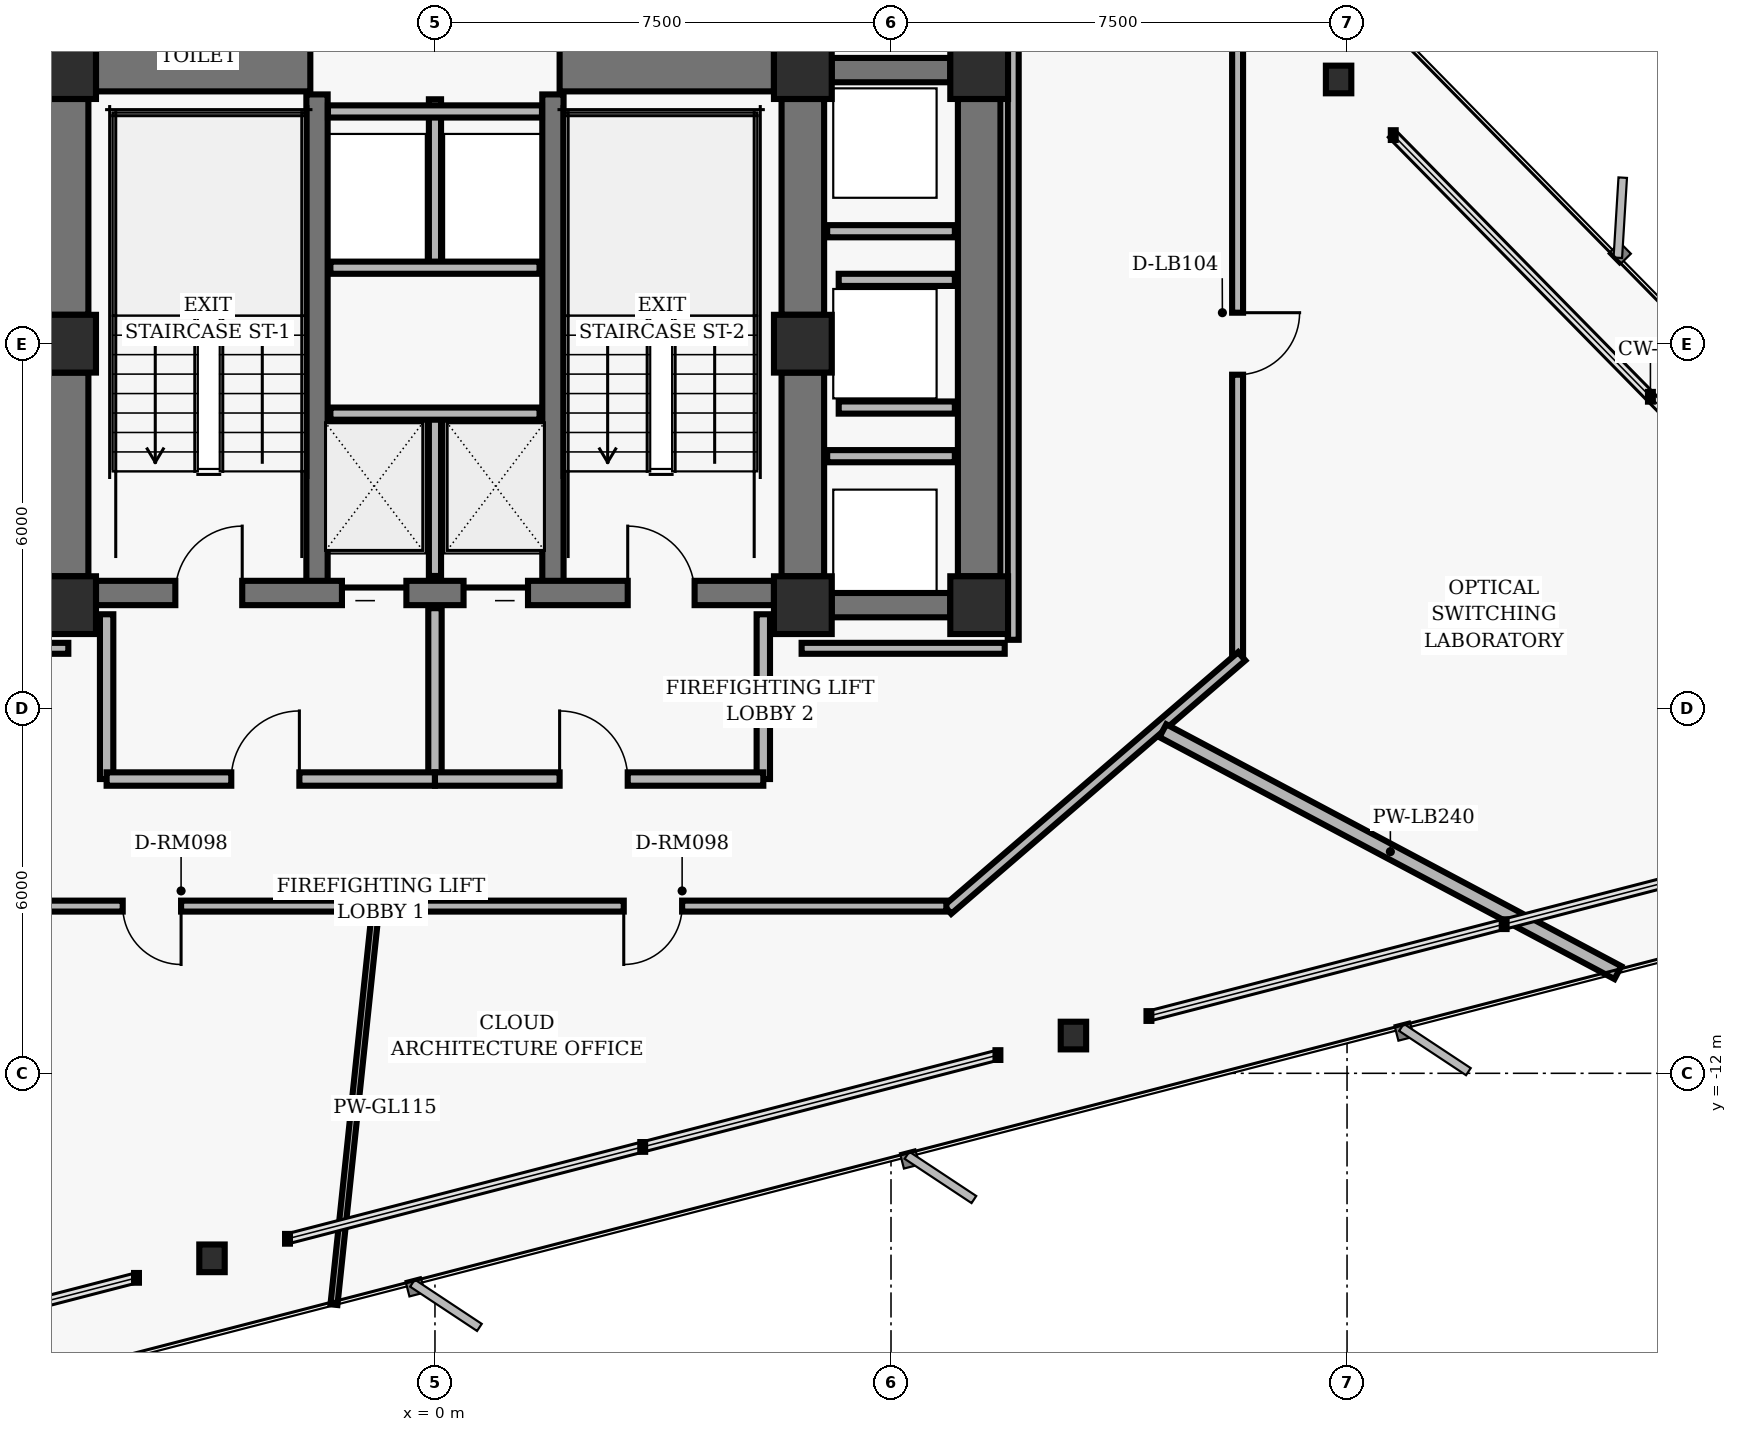
"""IFC4 building model, lengths in metres.
Left out: names, types, materials, properties, quantities, classifications, styles, units other than length and angle.
Written with IfcOpenShell. Run it as: python <this file> out.ifc"""

import sys

from ifc_helpers import new_model, si_unit, direction, frame, frame_2d, origin, origin_2d, place, context, subcontext, project, spatial, rectangle, hollow_rectangle, i_section, extrude, element, fill, save


model = new_model("IFC4")
c1 = context("Model", 3, precision=1e-05, world=origin(), true_north=direction((0.0, 1.0)))
c2 = subcontext(c1, "Body", "Model", "MODEL_VIEW")
j1 = project(units=[si_unit("LENGTHUNIT", "METRE"), si_unit("PLANEANGLEUNIT", "RADIAN")], contexts=[c1])
p1 = place(None, origin())
s1 = spatial("IfcSite", under=j1, at=p1, CompositionType="ELEMENT")
p2 = place(p1, origin())
s2 = spatial("IfcBuilding", under=s1, at=p2, CompositionType="ELEMENT")
p3 = place(p2, frame((0.0, 0.0, 85.6)))
s3 = spatial("IfcBuildingStorey", under=s2, at=p3, CompositionType="ELEMENT", Elevation=85.6)
for number, where, z_axis, x_axis in (
    (1, (-6.05, 4.5, 0.0), (0.0, 0.0, 1.0), (1.0, 0.0, 0.0)),
    (2, (6.05, 4.5, 0.0), (0.0, 0.0, 1.0), (1.0, 0.0, 0.0)),
    (3, (-6.05, 0.0, 0.0), (0.0, 0.0, 1.0), (1.0, 0.0, 0.0)),
    (4, (6.05, 0.0, 0.0), (0.0, 0.0, 1.0), (1.0, 0.0, 0.0)),
    (5, (-6.05, -4.3, 0.0), (0.0, 0.0, 1.0), (1.0, 0.0, 0.0)),
    (6, (6.05, -4.3, 0.0), (0.0, 0.0, 1.0), (1.0, 0.0, 0.0)),
    (7, (8.95, 4.5, 0.0), (0.0, 0.0, 1.0), (1.0, 0.0, 0.0)),
    (8, (8.95, -4.3, 0.0), (0.0, 0.0, 1.0), (1.0, 0.0, 0.0)),
):
    element("IfcColumn", number, at=place(p3, frame(where, z_axis=z_axis, x_axis=x_axis)), inside=s3, PredefinedType="COLUMN", context=c2, shape_type="SweptSolid", body=[
        extrude(hollow_rectangle(XDim=0.95, YDim=0.95, WallThickness=0.06, InnerFilletRadius=0.02, OuterFilletRadius=0.04, at=origin_2d()), origin(), (0.0, 0.0, 1.0), 3.04),
    ])
p4 = place(p3, frame((-6.05, 0.475, 0.0), z_axis=(0.0, 0.0, 1.0), x_axis=(0.0, 1.0, 0.0)))
e9 = element("IfcWall", 9, at=p4, inside=s3, PredefinedType="SHEAR", context=c2, shape_type="SweptSolid", body=[
    extrude(rectangle(XDim=3.55, YDim=0.7, at=frame_2d((1.775, 0.0))), origin(), (0.0, 0.0, 1.0), 2.788),
])
p5 = place(p3, frame((-6.05, -3.825, 0.0), z_axis=(0.0, 0.0, 1.0), x_axis=(0.0, 1.0, 0.0)))
e10 = element("IfcWall", 10, at=p5, inside=s3, PredefinedType="SHEAR", context=c2, shape_type="SweptSolid", body=[
    extrude(rectangle(XDim=3.35, YDim=0.7, at=frame_2d((1.675, 0.0))), origin(), (0.0, 0.0, 1.0), 2.788),
])
p6 = place(p3, frame((6.05, 0.475, 0.0), z_axis=(0.0, 0.0, 1.0), x_axis=(0.0, 1.0, 0.0)))
e11 = element("IfcWall", 11, at=p6, inside=s3, PredefinedType="SHEAR", context=c2, shape_type="SweptSolid", body=[
    extrude(rectangle(XDim=3.55, YDim=0.7, at=frame_2d((1.775, 0.0))), origin(), (0.0, 0.0, 1.0), 2.788),
])
p7 = place(p3, frame((6.05, -3.825, 0.0), z_axis=(0.0, 0.0, 1.0), x_axis=(0.0, 1.0, 0.0)))
e12 = element("IfcWall", 12, at=p7, inside=s3, PredefinedType="SHEAR", context=c2, shape_type="SweptSolid", body=[
    extrude(rectangle(XDim=3.35, YDim=0.7, at=frame_2d((1.675, 0.0))), origin(), (0.0, 0.0, 1.0), 2.788),
])
for number, where, z_axis, x_axis in (
    (13, (-1.94, -4.1, 0.0), (0.0, 0.0, 1.0), (0.0, 1.0, 0.0)),
    (14, (1.94, -4.1, 0.0), (0.0, 0.0, 1.0), (0.0, 1.0, 0.0)),
):
    element("IfcWall", number, at=place(p3, frame(where, z_axis=z_axis, x_axis=x_axis)), inside=s3, PredefinedType="SHEAR", context=c2, shape_type="SweptSolid", body=[
        extrude(rectangle(XDim=8.2, YDim=0.35, at=frame_2d((4.1, 0.0))), origin(), (0.0, 0.0, 1.0), 2.788),
    ])
p8 = place(p3, frame((-5.575, -4.1, 0.0), z_axis=(0.0, 0.0, 1.0), x_axis=(1.0, 0.0, 0.0)))
e15 = element("IfcWall", 15, at=p8, inside=s3, PredefinedType="SHEAR", context=c2, shape_type="SweptSolid", body=[
    extrude(rectangle(XDim=11.15, YDim=0.4, at=frame_2d((5.575, 0.0))), origin(), (0.0, 0.0, 1.0), 2.788),
])
p9 = place(p8, frame((1.305, 0.0, 0.0)))
e16 = element("IfcOpeningElement", 16, at=p9, cuts=e15, PredefinedType="OPENING", context=c2, shape_type="SweptSolid", body=[
    extrude(rectangle(XDim=1.1, YDim=2.04, at=frame_2d((0.55, 1.02))), frame((0.0, 0.21, 0.0), z_axis=(0.0, -1.0, 0.0), x_axis=(1.0, 0.0, 0.0)), (0.0, 0.0, 1.0), 0.42),
])
p10 = place(p8, frame((8.745, 0.0, 0.0)))
e17 = element("IfcOpeningElement", 17, at=p10, cuts=e15, PredefinedType="OPENING", context=c2, shape_type="SweptSolid", body=[
    extrude(rectangle(XDim=1.1, YDim=2.04, at=frame_2d((0.55, 1.02))), frame((0.0, 0.21, 0.0), z_axis=(0.0, -1.0, 0.0), x_axis=(1.0, 0.0, 0.0)), (0.0, 0.0, 1.0), 0.42),
])
p11 = place(p8, frame((4.045, 0.0, 0.0)))
e18 = element("IfcOpeningElement", 18, at=p11, cuts=e15, PredefinedType="OPENING", context=c2, shape_type="SweptSolid", body=[
    extrude(rectangle(XDim=1.06, YDim=2.04, at=frame_2d((0.53, 1.02))), frame((0.0, 0.21, 0.0), z_axis=(0.0, -1.0, 0.0), x_axis=(1.0, 0.0, 0.0)), (0.0, 0.0, 1.0), 0.42),
])
p12 = place(p8, frame((6.045, 0.0, 0.0)))
e19 = element("IfcOpeningElement", 19, at=p12, cuts=e15, PredefinedType="OPENING", context=c2, shape_type="SweptSolid", body=[
    extrude(rectangle(XDim=1.06, YDim=2.04, at=frame_2d((0.53, 1.02))), frame((0.0, 0.21, 0.0), z_axis=(0.0, -1.0, 0.0), x_axis=(1.0, 0.0, 0.0)), (0.0, 0.0, 1.0), 0.42),
])
for number, where, z_axis, x_axis in (
    (20, (-5.575, 4.5, 0.0), (0.0, 0.0, 1.0), (1.0, 0.0, 0.0)),
    (21, (2.05, 4.5, 0.0), (0.0, 0.0, 1.0), (1.0, 0.0, 0.0)),
):
    element("IfcWall", number, at=place(p3, frame(where, z_axis=z_axis, x_axis=x_axis)), inside=s3, PredefinedType="SHEAR", context=c2, shape_type="SweptSolid", body=[
        extrude(rectangle(XDim=3.525, YDim=0.7, at=frame_2d((1.762, 0.0))), origin(), (0.0, 0.0, 1.0), 2.788),
    ])
p13 = place(p3, frame((8.95, -3.825, 0.0), z_axis=(0.0, 0.0, 1.0), x_axis=(0.0, 1.0, 0.0)))
e22 = element("IfcWall", 22, at=p13, inside=s3, PredefinedType="SHEAR", context=c2, shape_type="SweptSolid", body=[
    extrude(rectangle(XDim=7.85, YDim=0.7, at=frame_2d((3.925, 0.0))), origin(), (0.0, 0.0, 1.0), 2.788),
])
for number, where, z_axis, x_axis in (
    (23, (6.525, 4.5, 0.0), (0.0, 0.0, 1.0), (1.0, 0.0, 0.0)),
    (24, (6.525, -4.3, 0.0), (0.0, 0.0, 1.0), (1.0, 0.0, 0.0)),
):
    element("IfcWall", number, at=place(p3, frame(where, z_axis=z_axis, x_axis=x_axis)), inside=s3, PredefinedType="SHEAR", context=c2, shape_type="SweptSolid", body=[
        extrude(rectangle(XDim=1.95, YDim=0.4, at=frame_2d((0.975, 0.0))), origin(), (0.0, 0.0, 1.0), 2.788),
    ])
for number, where, z_axis, x_axis in (
    (25, (14.861, 4.346, 0.0), (0.0, 0.0, 1.0), (1.0, 0.0, 0.0)),
    (26, (-3.667, -15.043, 0.0), (0.0, 0.0, 1.0), (1.0, 0.0, 0.0)),
    (27, (10.5, -11.379, 0.0), (0.0, 0.0, 1.0), (1.0, 0.0, 0.0)),
):
    element("IfcColumn", number, at=place(p3, frame(where, z_axis=z_axis, x_axis=x_axis)), inside=s3, PredefinedType="COLUMN", context=c2, shape_type="SweptSolid", body=[
        extrude(i_section(OverallWidth=0.418, OverallDepth=0.455, WebThickness=0.042, FlangeThickness=0.068, FilletRadius=0.025, at=origin_2d()), origin(), (0.0, 0.0, 1.0), 3.04),
    ])
p14 = place(p3, frame((0.0, -3.82, 0.0), z_axis=(0.0, 0.0, 1.0), x_axis=(0.0, 1.0, 0.0)))
e28 = element("IfcWall", 28, at=p14, inside=s3, PredefinedType="PARTITIONING", context=c2, shape_type="SweptSolid", body=[
    extrude(rectangle(XDim=2.67, YDim=0.2, at=frame_2d((1.335, 0.0))), origin(), (0.0, 0.0, 1.0), 2.763),
])
p15 = place(p3, frame((-1.72, -1.15, 0.0), z_axis=(0.0, 0.0, 1.0), x_axis=(1.0, 0.0, 0.0)))
e29 = element("IfcWall", 29, at=p15, inside=s3, PredefinedType="PARTITIONING", context=c2, shape_type="SweptSolid", body=[
    extrude(rectangle(XDim=3.44, YDim=0.2, at=frame_2d((1.72, 0.0))), origin(), (0.0, 0.0, 1.0), 2.763),
])
for number, where, z_axis, x_axis in (
    (30, (-5.4, -7.16, 0.0), (0.0, 0.0, 1.0), (0.0, 1.0, 0.0)),
    (31, (5.4, -7.16, 0.0), (0.0, 0.0, 1.0), (0.0, 1.0, 0.0)),
):
    element("IfcWall", number, at=place(p3, frame(where, z_axis=z_axis, x_axis=x_axis)), inside=s3, PredefinedType="PARTITIONING", context=c2, shape_type="SweptSolid", body=[
        extrude(rectangle(XDim=2.71, YDim=0.22, at=frame_2d((1.355, 0.0))), origin(), (0.0, 0.0, 1.0), 2.763),
    ])
p16 = place(p3, frame((0.0, -7.16, 0.0), z_axis=(0.0, 0.0, 1.0), x_axis=(0.0, 1.0, 0.0)))
e32 = element("IfcWall", 32, at=p16, inside=s3, PredefinedType="PARTITIONING", context=c2, shape_type="SweptSolid", body=[
    extrude(rectangle(XDim=2.81, YDim=0.22, at=frame_2d((1.405, 0.0))), origin(), (0.0, 0.0, 1.0), 2.763),
])
p17 = place(p3, frame((-5.4, -7.16, 0.0), z_axis=(0.0, 0.0, 1.0), x_axis=(1.0, 0.0, 0.0)))
e33 = element("IfcWall", 33, at=p17, inside=s3, PredefinedType="PARTITIONING", context=c2, shape_type="SweptSolid", body=[
    extrude(rectangle(XDim=5.4, YDim=0.22, at=frame_2d((2.7, 0.0))), origin(), (0.0, 0.0, 1.0), 2.763),
])
p18 = place(p17, frame((2.05, 0.0, 0.0)))
e34 = element("IfcOpeningElement", 34, at=p18, cuts=e33, PredefinedType="OPENING", context=c2, shape_type="SweptSolid", body=[
    extrude(rectangle(XDim=1.12, YDim=2.02, at=frame_2d((0.56, 1.01))), frame((0.0, 0.12, 0.0), z_axis=(0.0, -1.0, 0.0), x_axis=(1.0, 0.0, 0.0)), (0.0, 0.0, 1.0), 0.24),
])
p19 = place(p3, frame((0.0, -7.16, 0.0), z_axis=(0.0, 0.0, 1.0), x_axis=(1.0, 0.0, 0.0)))
e35 = element("IfcWall", 35, at=p19, inside=s3, PredefinedType="PARTITIONING", context=c2, shape_type="SweptSolid", body=[
    extrude(rectangle(XDim=5.4, YDim=0.22, at=frame_2d((2.7, 0.0))), origin(), (0.0, 0.0, 1.0), 2.763),
])
p20 = place(p19, frame((2.05, 0.0, 0.0)))
e36 = element("IfcOpeningElement", 36, at=p20, cuts=e35, PredefinedType="OPENING", context=c2, shape_type="SweptSolid", body=[
    extrude(rectangle(XDim=1.12, YDim=2.02, at=frame_2d((0.56, 1.01))), frame((0.0, 0.12, 0.0), z_axis=(0.0, -1.0, 0.0), x_axis=(1.0, 0.0, 0.0)), (0.0, 0.0, 1.0), 0.24),
])
p21 = place(p3, frame((0.0, 1.25, 0.0), z_axis=(0.0, 0.0, 1.0), x_axis=(0.0, 1.0, 0.0)))
e37 = element("IfcWall", 37, at=p21, inside=s3, PredefinedType="PARTITIONING", context=c2, shape_type="SweptSolid", body=[
    extrude(rectangle(XDim=2.77, YDim=0.2, at=frame_2d((1.385, 0.0))), origin(), (0.0, 0.0, 1.0), 2.763),
])
p22 = place(p3, frame((-1.72, 1.25, 0.0), z_axis=(0.0, 0.0, 1.0), x_axis=(1.0, 0.0, 0.0)))
e38 = element("IfcWall", 38, at=p22, inside=s3, PredefinedType="PARTITIONING", context=c2, shape_type="SweptSolid", body=[
    extrude(rectangle(XDim=3.44, YDim=0.2, at=frame_2d((1.72, 0.0))), origin(), (0.0, 0.0, 1.0), 2.763),
])
p23 = place(p3, frame((-1.76, 3.82, 0.0), z_axis=(0.0, 0.0, 1.0), x_axis=(1.0, 0.0, 0.0)))
e39 = element("IfcWall", 39, at=p23, inside=s3, PredefinedType="PARTITIONING", context=c2, shape_type="SweptSolid", body=[
    extrude(rectangle(XDim=3.52, YDim=0.2, at=frame_2d((1.76, 0.0))), origin(), (0.0, 0.0, 1.0), 2.763),
])
for number, where, z_axis, x_axis in (
    (40, (6.45, -1.85, 0.0), (0.0, 0.0, 1.0), (1.0, 0.0, 0.0)),
    (41, (6.45, 1.85, 0.0), (0.0, 0.0, 1.0), (1.0, 0.0, 0.0)),
):
    element("IfcWall", number, at=place(p3, frame(where, z_axis=z_axis, x_axis=x_axis)), inside=s3, PredefinedType="PARTITIONING", context=c2, shape_type="SweptSolid", body=[
        extrude(rectangle(XDim=2.1, YDim=0.2, at=frame_2d((1.05, 0.0))), origin(), (0.0, 0.0, 1.0), 2.763),
    ])
for number, where, z_axis, x_axis in (
    (42, (6.64, -1.05, 0.0), (0.0, 0.0, 1.0), (1.0, 0.0, 0.0)),
    (43, (6.64, 1.05, 0.0), (0.0, 0.0, 1.0), (1.0, 0.0, 0.0)),
):
    element("IfcWall", number, at=place(p3, frame(where, z_axis=z_axis, x_axis=x_axis)), inside=s3, PredefinedType="PARTITIONING", context=c2, shape_type="SweptSolid", body=[
        extrude(rectangle(XDim=1.91, YDim=0.2, at=frame_2d((0.955, 0.0))), origin(), (0.0, 0.0, 1.0), 2.763),
    ])
p24 = place(p3, frame((13.2, 5.11, 0.0), z_axis=(0.0, 0.0, 1.0), x_axis=(0.0, -1.0, 0.0)))
e44 = element("IfcWall", 44, at=p24, inside=s3, PredefinedType="PARTITIONING", context=c2, shape_type="SweptSolid", body=[
    extrude(rectangle(XDim=10.22, YDim=0.18, at=frame_2d((5.11, 0.0))), origin(), (0.0, 0.0, 1.0), 2.277),
])
p25 = place(p24, frame((4.6, 0.0, 0.0)))
e45 = element("IfcOpeningElement", 45, at=p25, cuts=e44, PredefinedType="OPENING", context=c2, shape_type="SweptSolid", body=[
    extrude(rectangle(XDim=1.02, YDim=2.02, at=frame_2d((0.51, 1.01))), frame((0.0, 0.1, 0.0), z_axis=(0.0, -1.0, 0.0), x_axis=(1.0, 0.0, 0.0)), (0.0, 0.0, 1.0), 0.2),
])
p26 = place(p3, frame((13.268, -5.141, 0.0), z_axis=(0.0, 0.0, 1.0), x_axis=(-0.757534501725, -0.65279512766, 0.0)))
e46 = element("IfcWall", 46, at=p26, inside=s3, PredefinedType="PARTITIONING", context=c2, shape_type="SweptSolid", body=[
    extrude(rectangle(XDim=6.385, YDim=0.18, at=frame_2d((3.192, 0.0))), origin(), (0.0, 0.0, 1.0), 2.763),
])
p27 = place(p3, frame((8.41, -9.25, 0.0), z_axis=(0.0, 0.0, 1.0), x_axis=(-1.0, 0.0, 0.0)))
e47 = element("IfcWall", 47, at=p27, inside=s3, PredefinedType="PARTITIONING", context=c2, shape_type="SweptSolid", body=[
    extrude(rectangle(XDim=17.0, YDim=0.18, at=frame_2d((8.5, 0.0))), origin(), (0.0, 0.0, 1.0), 2.277),
])
p28 = place(p27, frame((12.585, 0.0, 0.0)))
e48 = element("IfcOpeningElement", 48, at=p28, cuts=e47, PredefinedType="OPENING", context=c2, shape_type="SweptSolid", body=[
    extrude(rectangle(XDim=0.96, YDim=2.02, at=frame_2d((0.48, 1.01))), frame((0.0, 0.1, 0.0), z_axis=(0.0, -1.0, 0.0), x_axis=(1.0, 0.0, 0.0)), (0.0, 0.0, 1.0), 0.2),
])
p29 = place(p27, frame((4.345, 0.0, 0.0)))
e49 = element("IfcOpeningElement", 49, at=p29, cuts=e47, PredefinedType="OPENING", context=c2, shape_type="SweptSolid", body=[
    extrude(rectangle(XDim=0.96, YDim=2.02, at=frame_2d((0.48, 1.01))), frame((0.0, 0.1, 0.0), z_axis=(0.0, -1.0, 0.0), x_axis=(1.0, 0.0, 0.0)), (0.0, 0.0, 1.0), 0.2),
])
for number, where, z_axis, x_axis in (
    (50, (-9.37, -5.01, 0.0), (0.0, 0.0, 1.0), (1.0, 0.0, 0.0)),
    (51, (6.03, -5.01, 0.0), (0.0, 0.0, 1.0), (1.0, 0.0, 0.0)),
):
    element("IfcWall", number, at=place(p3, frame(where, z_axis=z_axis, x_axis=x_axis)), inside=s3, PredefinedType="PARTITIONING", context=c2, shape_type="SweptSolid", body=[
        extrude(rectangle(XDim=3.34, YDim=0.18, at=frame_2d((1.67, 0.0))), origin(), (0.0, 0.0, 1.0), 2.763),
    ])
p30 = place(p3, frame((9.51, -4.87, 0.0), z_axis=(0.0, 0.0, 1.0), x_axis=(0.0, 1.0, 0.0)))
e52 = element("IfcWall", 52, at=p30, inside=s3, PredefinedType="PARTITIONING", context=c2, shape_type="SweptSolid", body=[
    extrude(rectangle(XDim=9.74, YDim=0.18, at=frame_2d((4.87, 0.0))), origin(), (0.0, 0.0, 1.0), 2.048),
])
p31 = place(p3, frame((-0.981, -9.33, 0.0), z_axis=(0.0, 0.0, 1.0), x_axis=(-0.10451105245, -0.994523725165, 0.0)))
e53 = element("IfcWall", 53, at=p31, inside=s3, PredefinedType="MOVABLE", context=c2, shape_type="SweptSolid", body=[
    extrude(rectangle(XDim=6.51, YDim=0.115, at=frame_2d((3.255, 0.0))), origin(), (0.0, 0.0, 1.0), 2.763),
])
p32 = place(p3, frame((11.971, -6.365, 0.0), z_axis=(0.0, 0.0, 1.0), x_axis=(0.882953434006, -0.469460577021, 0.0)))
e54 = element("IfcWall", 54, at=p32, inside=s3, PredefinedType="PARTITIONING", context=c2, shape_type="SweptSolid", body=[
    extrude(rectangle(XDim=8.476, YDim=0.24, at=frame_2d((4.238, 0.0))), origin(), (0.0, 0.0, 1.0), 2.763),
])
p33 = place(p9, origin())
e55 = element("IfcDoor", 55, at=p33, inside=s3, OperationType="SINGLE_SWING_RIGHT", PredefinedType="DOOR", context=c2, shape_type="SweptSolid", body=[
    extrude(rectangle(XDim=1.1, YDim=2.04, at=frame_2d((0.55, 1.02))), frame((0.0, 0.025, 0.0), z_axis=(0.0, -1.0, 0.0), x_axis=(1.0, 0.0, 0.0)), (0.0, 0.0, 1.0), 0.05),
])
fill(e16, e55)
p34 = place(p10, origin())
e56 = element("IfcDoor", 56, at=p34, inside=s3, OperationType="SINGLE_SWING_LEFT", PredefinedType="DOOR", context=c2, shape_type="SweptSolid", body=[
    extrude(rectangle(XDim=1.1, YDim=2.04, at=frame_2d((0.55, 1.02))), frame((0.0, 0.025, 0.0), z_axis=(0.0, -1.0, 0.0), x_axis=(1.0, 0.0, 0.0)), (0.0, 0.0, 1.0), 0.05),
])
fill(e17, e56)
p35 = place(p11, origin())
e57 = element("IfcDoor", 57, at=p35, inside=s3, OperationType="SLIDING_TO_LEFT", PredefinedType="DOOR", context=c2, shape_type="SweptSolid", body=[
    extrude(rectangle(XDim=1.06, YDim=2.04, at=frame_2d((0.53, 1.02))), frame((0.0, 0.025, 0.0), z_axis=(0.0, -1.0, 0.0), x_axis=(1.0, 0.0, 0.0)), (0.0, 0.0, 1.0), 0.05),
])
fill(e18, e57)
p36 = place(p12, origin())
e58 = element("IfcDoor", 58, at=p36, inside=s3, OperationType="SLIDING_TO_RIGHT", PredefinedType="DOOR", context=c2, shape_type="SweptSolid", body=[
    extrude(rectangle(XDim=1.06, YDim=2.04, at=frame_2d((0.53, 1.02))), frame((0.0, 0.025, 0.0), z_axis=(0.0, -1.0, 0.0), x_axis=(1.0, 0.0, 0.0)), (0.0, 0.0, 1.0), 0.05),
])
fill(e19, e58)
p37 = place(p18, origin())
e59 = element("IfcDoor", 59, at=p37, inside=s3, OperationType="SINGLE_SWING_RIGHT", PredefinedType="DOOR", context=c2, shape_type="SweptSolid", body=[
    extrude(rectangle(XDim=1.12, YDim=2.02, at=frame_2d((0.56, 1.01))), frame((0.0, 0.025, 0.0), z_axis=(0.0, -1.0, 0.0), x_axis=(1.0, 0.0, 0.0)), (0.0, 0.0, 1.0), 0.05),
])
fill(e34, e59)
p38 = place(p20, origin())
e60 = element("IfcDoor", 60, at=p38, inside=s3, OperationType="SINGLE_SWING_LEFT", PredefinedType="DOOR", context=c2, shape_type="SweptSolid", body=[
    extrude(rectangle(XDim=1.12, YDim=2.02, at=frame_2d((0.56, 1.01))), frame((0.0, 0.025, 0.0), z_axis=(0.0, -1.0, 0.0), x_axis=(1.0, 0.0, 0.0)), (0.0, 0.0, 1.0), 0.05),
])
fill(e36, e60)
p39 = place(p28, origin())
e61 = element("IfcDoor", 61, at=p39, inside=s3, OperationType="SINGLE_SWING_LEFT", PredefinedType="DOOR", context=c2, shape_type="SweptSolid", body=[
    extrude(rectangle(XDim=0.96, YDim=2.02, at=frame_2d((0.48, 1.01))), frame((0.0, 0.025, 0.0), z_axis=(0.0, -1.0, 0.0), x_axis=(1.0, 0.0, 0.0)), (0.0, 0.0, 1.0), 0.05),
])
fill(e48, e61)
p40 = place(p29, origin())
e62 = element("IfcDoor", 62, at=p40, inside=s3, OperationType="SINGLE_SWING_RIGHT", PredefinedType="DOOR", context=c2, shape_type="SweptSolid", body=[
    extrude(rectangle(XDim=0.96, YDim=2.02, at=frame_2d((0.48, 1.01))), frame((0.0, 0.025, 0.0), z_axis=(0.0, -1.0, 0.0), x_axis=(1.0, 0.0, 0.0)), (0.0, 0.0, 1.0), 0.05),
])
fill(e49, e62)
p41 = place(p25, origin())
e63 = element("IfcDoor", 63, at=p41, inside=s3, OperationType="SINGLE_SWING_LEFT", PredefinedType="DOOR", context=c2, shape_type="SweptSolid", body=[
    extrude(rectangle(XDim=1.02, YDim=2.02, at=frame_2d((0.51, 1.01))), frame((0.0, 0.025, 0.0), z_axis=(0.0, -1.0, 0.0), x_axis=(1.0, 0.0, 0.0)), (0.0, 0.0, 1.0), 0.05),
])
fill(e45, e63)
save(model, sys.argv[1])
